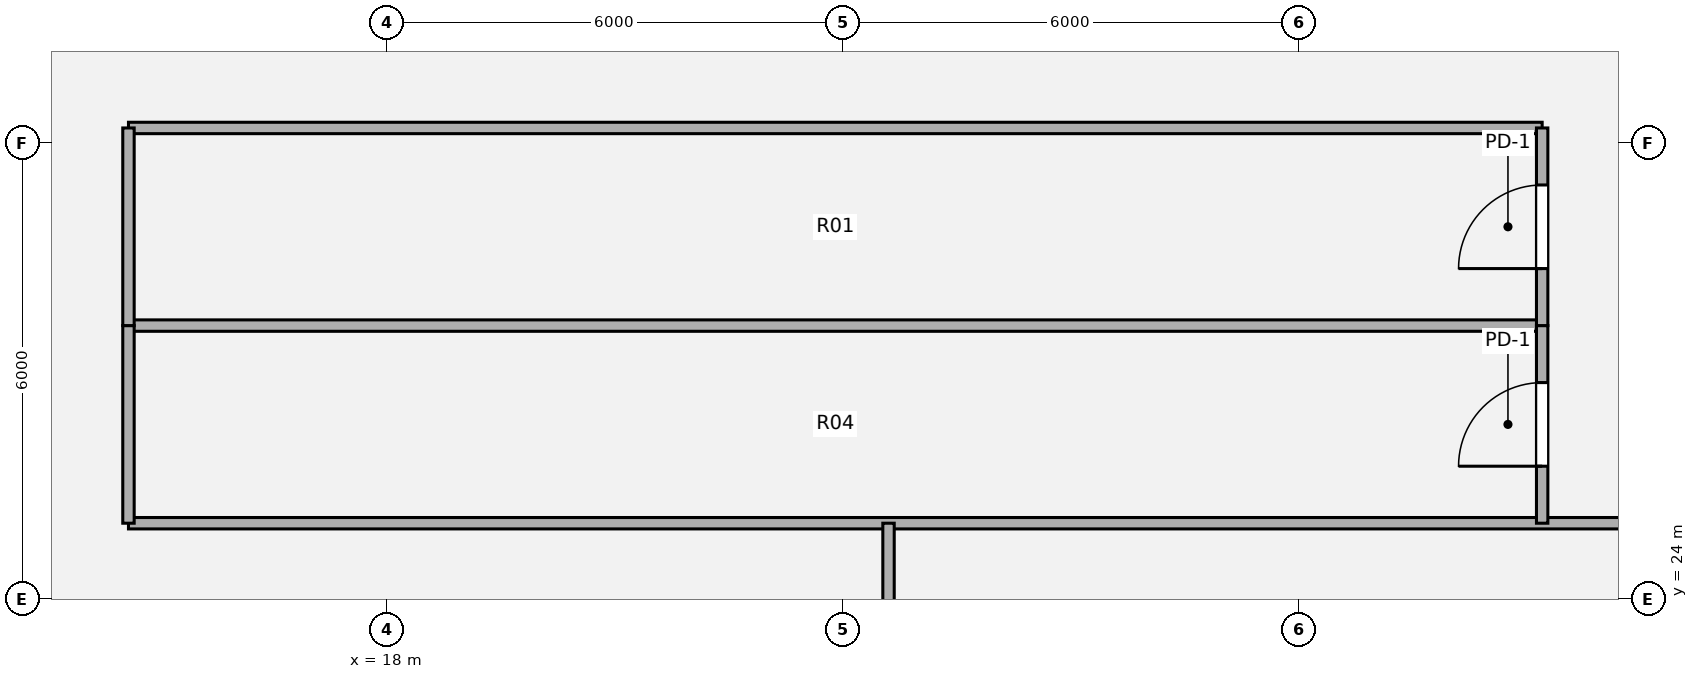
"""IFC4 building model, lengths in metres.
Left out: names, types, materials, properties, quantities, classifications, styles, units other than length and angle.
Written with IfcOpenShell. Run it as: python <this file> out.ifc"""

import sys

from ifc_helpers import new_model, si_unit, direction, frame, frame_2d, origin, origin_2d, place, context, subcontext, project, spatial, rectangle, hollow_circle, extrude, source, transform, mapped, element, fill, save


model = new_model("IFC4")
c1 = context("Model", 3, precision=1e-05, world=origin(), true_north=direction((0.0, 1.0)))
c2 = subcontext(c1, "Body", "Model", "MODEL_VIEW")
j1 = project(units=[si_unit("LENGTHUNIT", "METRE"), si_unit("PLANEANGLEUNIT", "RADIAN")], contexts=[c1])
p1 = place(None, origin())
s1 = spatial("IfcSite", under=j1, at=p1, CompositionType="ELEMENT")
p2 = place(p1, origin())
s2 = spatial("IfcBuilding", under=s1, at=p2, CompositionType="ELEMENT")
p3 = place(p2, frame((0.0, 0.0, 79.92)))
s3 = spatial("IfcBuildingStorey", under=s2, at=p3, CompositionType="ELEMENT", Elevation=79.92)
m1 = source(origin(), c2, "Body", "SweptSolid", [
    extrude(hollow_circle(Radius=0.75, WallThickness=0.05, at=origin_2d()), origin(), (0.0, 0.0, 1.0), 6.169),
])
p4 = place(p3, frame((14.04, 20.292, 0.47), z_axis=(0.153353617599, 0.581200316919, 0.799180117109), x_axis=(-0.966908028217, 0.255125194698, 0.0)))
e1 = element("IfcColumn", 1, at=p4, inside=s3, PredefinedType="COLUMN", context=c2, shape_type="MappedRepresentation", body=[
    mapped(m1, transform((0.0, 0.0, 0.0), x_axis=(1.0, 0.0, 0.0), y_axis=(0.0, 1.0, 0.0), z_axis=(0.0, 0.0, 1.0), scale=1.0)),
])
m2 = source(origin(), c2, "Body", "SweptSolid", [
    extrude(hollow_circle(Radius=0.75, WallThickness=0.05, at=origin_2d()), origin(), (0.0, 0.0, 1.0), 6.48),
])
p5 = place(p3, frame((14.048, 30.884, 0.511), z_axis=(0.144794363389, 0.640139535252, 0.754490535221), x_axis=(-0.975360167554, 0.220618547611, 0.0)))
e2 = element("IfcColumn", 2, at=p5, inside=s3, PredefinedType="COLUMN", context=c2, shape_type="MappedRepresentation", body=[
    mapped(m2, transform((0.0, 0.0, 0.0), x_axis=(1.0, 0.0, 0.0), y_axis=(0.0, 1.0, 0.0), z_axis=(0.0, 0.0, 1.0), scale=1.0)),
])
m3 = source(origin(), c2, "Body", "SweptSolid", [
    extrude(hollow_circle(Radius=0.75, WallThickness=0.05, at=origin_2d()), origin(), (0.0, 0.0, 1.0), 6.108),
])
p6 = place(p3, frame((31.35, 20.285, 0.46), z_axis=(0.0, 0.588155061487, 0.808748183087), x_axis=(-1.0, 0.0, 0.0)))
e3 = element("IfcColumn", 3, at=p6, inside=s3, PredefinedType="COLUMN", context=c2, shape_type="MappedRepresentation", body=[
    mapped(m3, transform((0.0, 0.0, 0.0), x_axis=(1.0, 0.0, 0.0), y_axis=(0.0, 1.0, 0.0), z_axis=(0.0, 0.0, 1.0), scale=1.0)),
])
p7 = place(p3, frame((14.6, 25.0, 0.0), z_axis=(0.0, 0.0, 1.0), x_axis=(1.0, 0.0, 0.0)))
e4 = element("IfcWall", 4, at=p7, inside=s3, PredefinedType="PARTITIONING", context=c2, shape_type="SweptSolid", body=[
    extrude(rectangle(XDim=19.9, YDim=0.15, at=frame_2d((9.95, 0.0))), origin(), (0.0, 0.0, 1.0), 4.532),
])
for number, where, z_axis, x_axis in (
    (5, (14.6, 27.6, 0.0), (0.0, 0.0, 1.0), (1.0, 0.0, 0.0)),
    (6, (14.6, 30.2, 0.0), (0.0, 0.0, 1.0), (1.0, 0.0, 0.0)),
):
    element("IfcWall", number, at=place(p3, frame(where, z_axis=z_axis, x_axis=x_axis)), inside=s3, PredefinedType="PARTITIONING", context=c2, shape_type="SweptSolid", body=[
        extrude(rectangle(XDim=18.6, YDim=0.15, at=frame_2d((9.3, 0.0))), origin(), (0.0, 0.0, 1.0), 4.532),
    ])
p8 = place(p3, frame((14.6, 25.0, 0.0), z_axis=(0.0, 0.0, 1.0), x_axis=(0.0, 1.0, 0.0)))
e7 = element("IfcWall", 7, at=p8, inside=s3, PredefinedType="PARTITIONING", context=c2, shape_type="SweptSolid", body=[
    extrude(rectangle(XDim=2.6, YDim=0.15, at=frame_2d((1.3, 0.0))), origin(), (0.0, 0.0, 1.0), 5.05),
])
p9 = place(p3, frame((14.6, 27.6, 0.0), z_axis=(0.0, 0.0, 1.0), x_axis=(0.0, 1.0, 0.0)))
e8 = element("IfcWall", 8, at=p9, inside=s3, PredefinedType="PARTITIONING", context=c2, shape_type="SweptSolid", body=[
    extrude(rectangle(XDim=2.6, YDim=0.15, at=frame_2d((1.3, 0.0))), origin(), (0.0, 0.0, 1.0), 5.05),
])
p10 = place(p3, frame((24.6, 20.4, 0.0), z_axis=(0.0, 0.0, 1.0), x_axis=(0.0, 1.0, 0.0)))
e9 = element("IfcWall", 9, at=p10, inside=s3, PredefinedType="PARTITIONING", context=c2, shape_type="SweptSolid", body=[
    extrude(rectangle(XDim=4.6, YDim=0.15, at=frame_2d((2.3, 0.0))), origin(), (0.0, 0.0, 1.0), 5.05),
])
p11 = place(p3, frame((33.2, 25.0, 0.0), z_axis=(0.0, 0.0, 1.0), x_axis=(0.0, 1.0, 0.0)))
e10 = element("IfcWall", 10, at=p11, inside=s3, PredefinedType="PARTITIONING", context=c2, shape_type="SweptSolid", body=[
    extrude(rectangle(XDim=2.6, YDim=0.15, at=frame_2d((1.3, 0.0))), origin(), (0.0, 0.0, 1.0), 5.05),
])
p12 = place(p11, frame((0.75, 0.0, 0.0)))
e11 = element("IfcOpeningElement", 11, at=p12, cuts=e10, PredefinedType="OPENING", context=c2, shape_type="SweptSolid", body=[
    extrude(rectangle(XDim=1.1, YDim=2.1, at=origin_2d()), frame((0.55, 0.085, 1.05), z_axis=(0.0, -1.0, 0.0), x_axis=(1.0, 0.0, 0.0)), (0.0, 0.0, 1.0), 0.17),
])
p13 = place(p3, frame((33.2, 27.6, 0.0), z_axis=(0.0, 0.0, 1.0), x_axis=(0.0, 1.0, 0.0)))
e12 = element("IfcWall", 12, at=p13, inside=s3, PredefinedType="PARTITIONING", context=c2, shape_type="SweptSolid", body=[
    extrude(rectangle(XDim=2.6, YDim=0.15, at=frame_2d((1.3, 0.0))), origin(), (0.0, 0.0, 1.0), 5.05),
])
p14 = place(p13, frame((0.75, 0.0, 0.0)))
e13 = element("IfcOpeningElement", 13, at=p14, cuts=e12, PredefinedType="OPENING", context=c2, shape_type="SweptSolid", body=[
    extrude(rectangle(XDim=1.1, YDim=2.1, at=origin_2d()), frame((0.55, 0.085, 1.05), z_axis=(0.0, -1.0, 0.0), x_axis=(1.0, 0.0, 0.0)), (0.0, 0.0, 1.0), 0.17),
])
m4 = source(origin(), c2, "Body", "SweptSolid", [
    extrude(rectangle(XDim=1.1, YDim=2.1, at=origin_2d()), frame((0.55, 0.025, 1.05), z_axis=(0.0, -1.0, 0.0), x_axis=(1.0, 0.0, 0.0)), (0.0, 0.0, 1.0), 0.05),
])
p15 = place(p12, origin())
e14 = element("IfcDoor", 14, at=p15, inside=s3, OperationType="SINGLE_SWING_LEFT", PredefinedType="DOOR", context=c2, shape_type="MappedRepresentation", body=[
    mapped(m4, transform((0.0, 0.0, 0.0), x_axis=(1.0, 0.0, 0.0), y_axis=(0.0, 1.0, 0.0), z_axis=(0.0, 0.0, 1.0), scale=1.0)),
])
fill(e11, e14)
p16 = place(p14, origin())
e15 = element("IfcDoor", 15, at=p16, inside=s3, OperationType="SINGLE_SWING_LEFT", PredefinedType="DOOR", context=c2, shape_type="MappedRepresentation", body=[
    mapped(m4, transform((0.0, 0.0, 0.0), x_axis=(1.0, 0.0, 0.0), y_axis=(0.0, 1.0, 0.0), z_axis=(0.0, 0.0, 1.0), scale=1.0)),
])
fill(e13, e15)
save(model, sys.argv[1])
